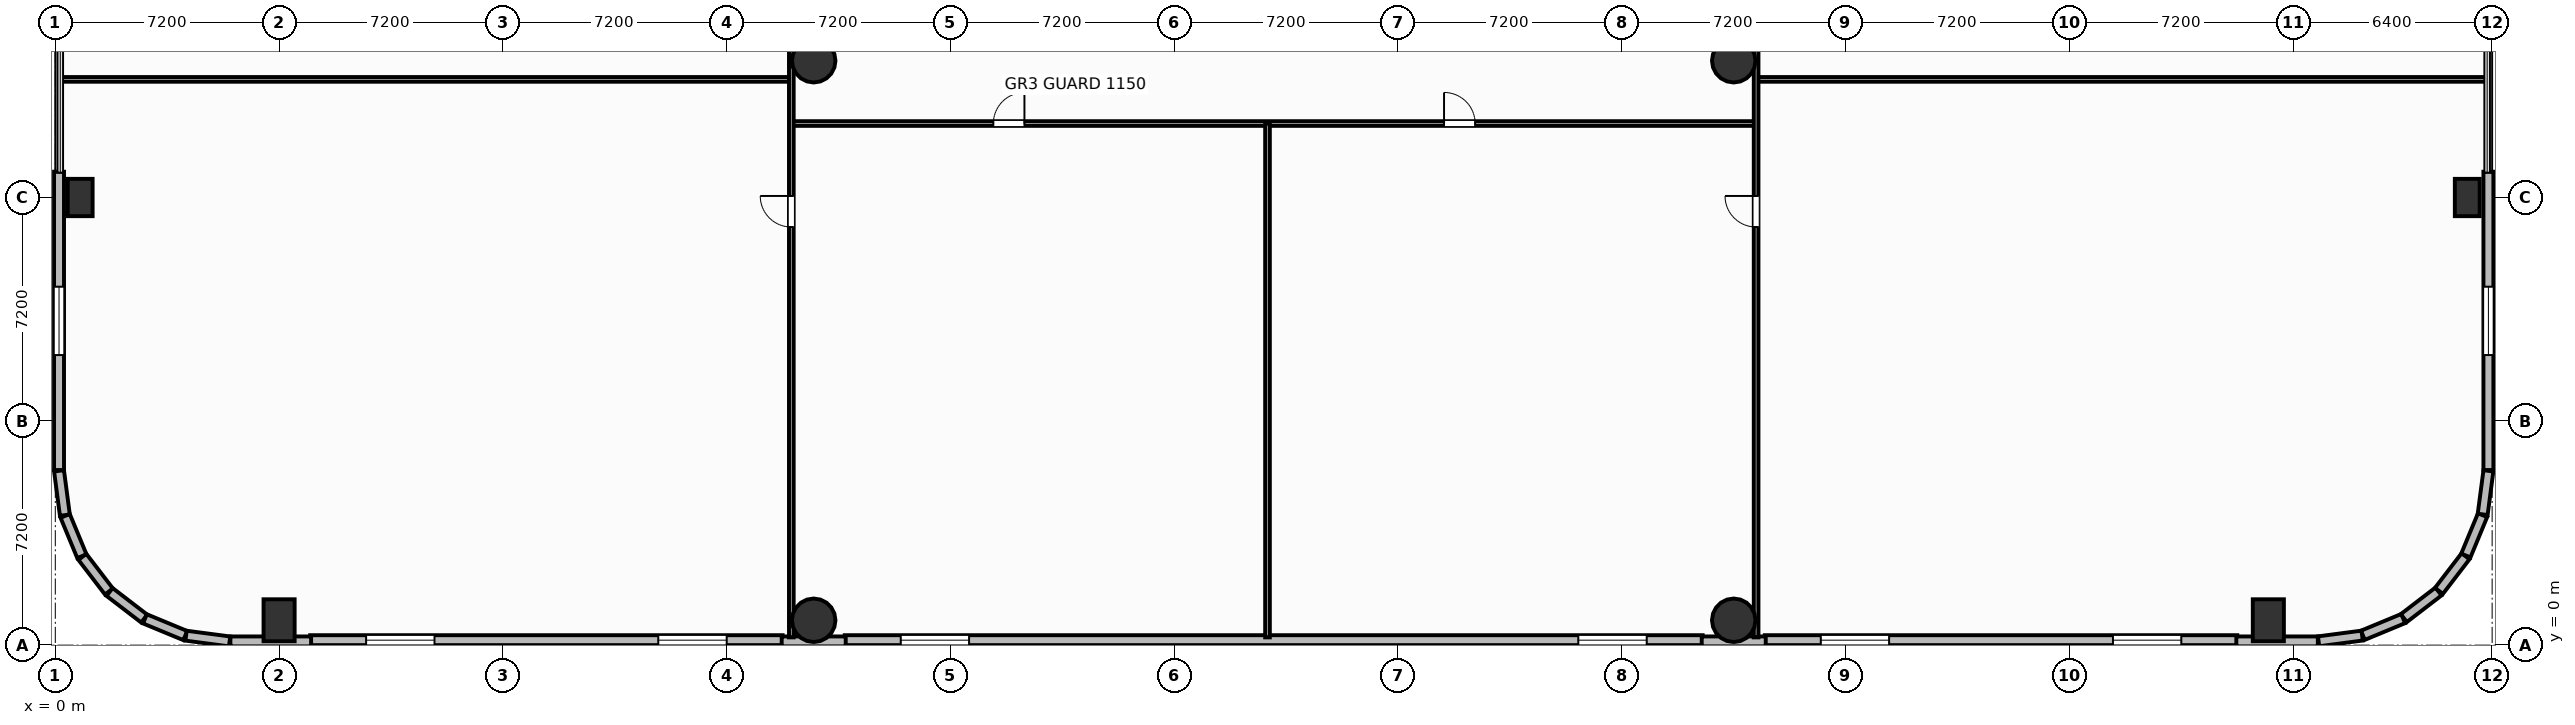
"""IFC4 building model, lengths in metres.
Left out: names, types, materials, properties, quantities, classifications, styles, units other than length and angle.
Written with IfcOpenShell. Run it as: python <this file> out.ifc"""

import sys

from ifc_helpers import new_model, si_unit, direction, frame, frame_2d, origin, origin_2d, place, context, subcontext, project, spatial, rectangle, circle, extrude, element, fill, save


model = new_model("IFC4")
c1 = context("Model", 3, precision=1e-05, world=origin(), true_north=direction((0.0, 1.0)))
c2 = subcontext(c1, "Body", "Model", "MODEL_VIEW")
j1 = project(units=[si_unit("LENGTHUNIT", "METRE"), si_unit("PLANEANGLEUNIT", "RADIAN")], contexts=[c1])
p1 = place(None, origin())
s1 = spatial("IfcSite", under=j1, at=p1, CompositionType="ELEMENT")
p2 = place(p1, origin())
s2 = spatial("IfcBuilding", under=s1, at=p2, CompositionType="ELEMENT")
p3 = place(p2, frame((0.0, 0.0, 21.6)))
s3 = spatial("IfcBuildingStorey", under=s2, at=p3, CompositionType="ELEMENT", Elevation=21.6)
p4 = place(p3, frame((7.2, 0.8, 0.0), z_axis=(0.0, 0.0, 1.0), x_axis=(1.0, 0.0, 0.0)))
e1 = element("IfcColumn", 1, at=p4, inside=s3, PredefinedType="COLUMN", context=c2, shape_type="SweptSolid", body=[
    extrude(rectangle(XDim=1.0, YDim=1.35, at=origin_2d()), origin(), (0.0, 0.0, 1.0), 5.4),
])
for number, where, z_axis, x_axis in (
    (2, (24.4, 0.8, 0.0), (0.0, 0.0, 1.0), (1.0, 0.0, 0.0)),
    (3, (54.0, 0.8, 0.0), (0.0, 0.0, 1.0), (1.0, 0.0, 0.0)),
):
    element("IfcColumn", number, at=place(p3, frame(where, z_axis=z_axis, x_axis=x_axis)), inside=s3, PredefinedType="COLUMN", context=c2, shape_type="SweptSolid", body=[
        extrude(circle(Radius=0.7, at=origin_2d()), origin(), (0.0, 0.0, 1.0), 5.4),
    ])
p5 = place(p3, frame((71.2, 0.8, 0.0), z_axis=(0.0, 0.0, 1.0), x_axis=(1.0, 0.0, 0.0)))
e4 = element("IfcColumn", 4, at=p5, inside=s3, PredefinedType="COLUMN", context=c2, shape_type="SweptSolid", body=[
    extrude(rectangle(XDim=1.0, YDim=1.35, at=origin_2d()), origin(), (0.0, 0.0, 1.0), 5.4),
])
for number, where, z_axis, x_axis in (
    (5, (24.4, 18.8, 0.0), (0.0, 0.0, 1.0), (1.0, 0.0, 0.0)),
    (6, (54.0, 18.8, 0.0), (0.0, 0.0, 1.0), (1.0, 0.0, 0.0)),
):
    element("IfcColumn", number, at=place(p3, frame(where, z_axis=z_axis, x_axis=x_axis)), inside=s3, PredefinedType="COLUMN", context=c2, shape_type="SweptSolid", body=[
        extrude(circle(Radius=0.7, at=origin_2d()), origin(), (0.0, 0.0, 1.0), 5.4),
    ])
for number, where, z_axis, x_axis in (
    (7, (0.8, 14.4, 0.0), (0.0, 0.0, 1.0), (1.0, 0.0, 0.0)),
    (8, (77.6, 14.4, 0.0), (0.0, 0.0, 1.0), (1.0, 0.0, 0.0)),
):
    element("IfcColumn", number, at=place(p3, frame(where, z_axis=z_axis, x_axis=x_axis)), inside=s3, PredefinedType="PILASTER", context=c2, shape_type="SweptSolid", body=[
        extrude(rectangle(XDim=0.8, YDim=1.2, at=origin_2d()), origin(), (0.0, 0.0, 1.0), 5.4),
    ])
p6 = place(p3, frame((23.4, 0.16, 0.0), z_axis=(0.0, 0.0, 1.0), x_axis=(-1.0, 0.0, 0.0)))
e9 = element("IfcWall", 9, at=p6, inside=s3, PredefinedType="SOLIDWALL", context=c2, shape_type="SweptSolid", body=[
    extrude(rectangle(XDim=15.2, YDim=0.32, at=frame_2d((7.6, 0.0))), origin(), (0.0, 0.0, 1.0), 4.1),
])
p7 = place(p6, frame((1.8, 0.0, 0.8)))
e10 = element("IfcOpeningElement", 10, at=p7, cuts=e9, PredefinedType="OPENING", context=c2, shape_type="SweptSolid", body=[
    extrude(rectangle(XDim=2.2, YDim=1.11, at=frame_2d((1.1, 0.555))), frame((0.0, 0.17, 0.0), z_axis=(0.0, -1.0, 0.0), x_axis=(1.0, 0.0, 0.0)), (0.0, 0.0, 1.0), 0.34),
])
p8 = place(p6, frame((11.2, 0.0, 0.8)))
e11 = element("IfcOpeningElement", 11, at=p8, cuts=e9, PredefinedType="OPENING", context=c2, shape_type="SweptSolid", body=[
    extrude(rectangle(XDim=2.2, YDim=1.11, at=frame_2d((1.1, 0.555))), frame((0.0, 0.17, 0.0), z_axis=(0.0, -1.0, 0.0), x_axis=(1.0, 0.0, 0.0)), (0.0, 0.0, 1.0), 0.34),
])
p9 = place(p3, frame((53.0, 0.16, 0.0), z_axis=(0.0, 0.0, 1.0), x_axis=(-1.0, 0.0, 0.0)))
e12 = element("IfcWall", 12, at=p9, inside=s3, PredefinedType="SOLIDWALL", context=c2, shape_type="SweptSolid", body=[
    extrude(rectangle(XDim=27.6, YDim=0.32, at=frame_2d((13.8, 0.0))), origin(), (0.0, 0.0, 1.0), 4.1),
])
p10 = place(p9, frame((1.8, 0.0, 0.8)))
e13 = element("IfcOpeningElement", 13, at=p10, cuts=e12, PredefinedType="OPENING", context=c2, shape_type="SweptSolid", body=[
    extrude(rectangle(XDim=2.2, YDim=1.11, at=frame_2d((1.1, 0.555))), frame((0.0, 0.17, 0.0), z_axis=(0.0, -1.0, 0.0), x_axis=(1.0, 0.0, 0.0)), (0.0, 0.0, 1.0), 0.34),
])
p11 = place(p9, frame((23.6, 0.0, 0.8)))
e14 = element("IfcOpeningElement", 14, at=p11, cuts=e12, PredefinedType="OPENING", context=c2, shape_type="SweptSolid", body=[
    extrude(rectangle(XDim=2.2, YDim=1.11, at=frame_2d((1.1, 0.555))), frame((0.0, 0.17, 0.0), z_axis=(0.0, -1.0, 0.0), x_axis=(1.0, 0.0, 0.0)), (0.0, 0.0, 1.0), 0.34),
])
p12 = place(p3, frame((70.2, 0.16, 0.0), z_axis=(0.0, 0.0, 1.0), x_axis=(-1.0, 0.0, 0.0)))
e15 = element("IfcWall", 15, at=p12, inside=s3, PredefinedType="SOLIDWALL", context=c2, shape_type="SweptSolid", body=[
    extrude(rectangle(XDim=15.2, YDim=0.32, at=frame_2d((7.6, 0.0))), origin(), (0.0, 0.0, 1.0), 4.1),
])
p13 = place(p12, frame((1.8, 0.0, 0.8)))
e16 = element("IfcOpeningElement", 16, at=p13, cuts=e15, PredefinedType="OPENING", context=c2, shape_type="SweptSolid", body=[
    extrude(rectangle(XDim=2.2, YDim=1.11, at=frame_2d((1.1, 0.555))), frame((0.0, 0.17, 0.0), z_axis=(0.0, -1.0, 0.0), x_axis=(1.0, 0.0, 0.0)), (0.0, 0.0, 1.0), 0.34),
])
p14 = place(p12, frame((11.2, 0.0, 0.8)))
e17 = element("IfcOpeningElement", 17, at=p14, cuts=e15, PredefinedType="OPENING", context=c2, shape_type="SweptSolid", body=[
    extrude(rectangle(XDim=2.2, YDim=1.11, at=frame_2d((1.1, 0.555))), frame((0.0, 0.17, 0.0), z_axis=(0.0, -1.0, 0.0), x_axis=(1.0, 0.0, 0.0)), (0.0, 0.0, 1.0), 0.34),
])
p15 = place(p3, frame((0.12, 5.608, 0.0), z_axis=(0.0, 0.0, 1.0), x_axis=(0.130362303307, -0.991466423978, 0.0)))
e18 = element("IfcWall", 18, at=p15, inside=s3, PredefinedType="SOLIDWALL", context=c2, shape_type="SweptSolid", body=[
    extrude(rectangle(XDim=1.438, YDim=0.32, at=frame_2d((0.719, 0.0))), origin(), (0.0, 0.0, 1.0), 4.1),
])
p16 = place(p3, frame((0.317, 4.159, 0.0), z_axis=(0.0, 0.0, 1.0), x_axis=(0.382628033724, -0.923902477434, 0.0)))
e19 = element("IfcWall", 19, at=p16, inside=s3, PredefinedType="SOLIDWALL", context=c2, shape_type="SweptSolid", body=[
    extrude(rectangle(XDim=1.405, YDim=0.32, at=frame_2d((0.703, 0.0))), origin(), (0.0, 0.0, 1.0), 4.1),
])
p17 = place(p3, frame((0.87, 2.841, 0.0), z_axis=(0.0, 0.0, 1.0), x_axis=(0.60871962085, -0.79338541907, 0.0)))
e20 = element("IfcWall", 20, at=p17, inside=s3, PredefinedType="SOLIDWALL", context=c2, shape_type="SweptSolid", body=[
    extrude(rectangle(XDim=1.405, YDim=0.32, at=frame_2d((0.703, 0.0))), origin(), (0.0, 0.0, 1.0), 4.1),
])
for number, where, z_axis, x_axis in (
    (21, (1.746, 1.711, 0.0), (0.0, 0.0, 1.0), (0.793, -0.609, 0.0)),
    (22, (2.884, 0.846, 0.0), (0.0, 0.0, 1.0), (0.924, -0.383, 0.0)),
):
    element("IfcWall", number, at=place(p3, frame(where, z_axis=z_axis, x_axis=x_axis)), inside=s3, PredefinedType="SOLIDWALL", context=c2, shape_type="SweptSolid", body=[
        extrude(rectangle(XDim=1.406, YDim=0.32, at=frame_2d((0.703, 0.0))), origin(), (0.0, 0.0, 1.0), 4.1),
    ])
p18 = place(p3, frame((4.207, 0.304, 0.0), z_axis=(0.0, 0.0, 1.0), x_axis=(0.991457235349, -0.130432168094, 0.0)))
e23 = element("IfcWall", 23, at=p18, inside=s3, PredefinedType="SOLIDWALL", context=c2, shape_type="SweptSolid", body=[
    extrude(rectangle(XDim=1.413, YDim=0.32, at=frame_2d((0.707, 0.0))), origin(), (0.0, 0.0, 1.0), 4.1),
])
p19 = place(p3, frame((5.633, 0.12, 0.0), z_axis=(0.0, 0.0, 1.0), x_axis=(1.0, 0.0, 0.0)))
e24 = element("IfcWall", 24, at=p19, inside=s3, PredefinedType="SOLIDWALL", context=c2, shape_type="SweptSolid", body=[
    extrude(rectangle(XDim=2.597, YDim=0.32, at=frame_2d((1.299, 0.0))), origin(), (0.0, 0.0, 1.0), 4.1),
])
p20 = place(p3, frame((23.37, 0.12, 0.0), z_axis=(0.0, 0.0, 1.0), x_axis=(1.0, 0.0, 0.0)))
e25 = element("IfcWall", 25, at=p20, inside=s3, PredefinedType="SOLIDWALL", context=c2, shape_type="SweptSolid", body=[
    extrude(rectangle(XDim=2.06, YDim=0.32, at=frame_2d((1.03, 0.0))), origin(), (0.0, 0.0, 1.0), 4.1),
])
p21 = place(p3, frame((52.97, 0.12, 0.0), z_axis=(0.0, 0.0, 1.0), x_axis=(1.0, 0.0, 0.0)))
e26 = element("IfcWall", 26, at=p21, inside=s3, PredefinedType="SOLIDWALL", context=c2, shape_type="SweptSolid", body=[
    extrude(rectangle(XDim=2.06, YDim=0.32, at=frame_2d((1.03, 0.0))), origin(), (0.0, 0.0, 1.0), 4.1),
])
p22 = place(p3, frame((70.17, 0.12, 0.0), z_axis=(0.0, 0.0, 1.0), x_axis=(1.0, 0.0, 0.0)))
e27 = element("IfcWall", 27, at=p22, inside=s3, PredefinedType="SOLIDWALL", context=c2, shape_type="SweptSolid", body=[
    extrude(rectangle(XDim=2.622, YDim=0.32, at=frame_2d((1.311, 0.0))), origin(), (0.0, 0.0, 1.0), 4.1),
])
p23 = place(p3, frame((72.817, 0.123, 0.0), z_axis=(0.0, 0.0, 1.0), x_axis=(0.991457235349, 0.130432168094, 0.0)))
e28 = element("IfcWall", 28, at=p23, inside=s3, PredefinedType="SOLIDWALL", context=c2, shape_type="SweptSolid", body=[
    extrude(rectangle(XDim=1.413, YDim=0.32, at=frame_2d((0.707, 0.0))), origin(), (0.0, 0.0, 1.0), 4.1),
])
for number, where, z_axis, x_axis in (
    (29, (74.241, 0.317, 0.0), (0.0, 0.0, 1.0), (0.924, 0.383, 0.0)),
    (30, (75.559, 0.87, 0.0), (0.0, 0.0, 1.0), (0.793, 0.609, 0.0)),
    (31, (76.689, 1.746, 0.0), (0.0, 0.0, 1.0), (0.609, 0.793, 0.0)),
    (32, (77.554, 2.884, 0.0), (0.0, 0.0, 1.0), (0.383, 0.924, 0.0)),
):
    element("IfcWall", number, at=place(p3, frame(where, z_axis=z_axis, x_axis=x_axis)), inside=s3, PredefinedType="SOLIDWALL", context=c2, shape_type="SweptSolid", body=[
        extrude(rectangle(XDim=1.405, YDim=0.32, at=frame_2d((0.703, 0.0))), origin(), (0.0, 0.0, 1.0), 4.1),
    ])
p24 = place(p3, frame((78.096, 4.207, 0.0), z_axis=(0.0, 0.0, 1.0), x_axis=(0.130432168094, 0.991457235349, 0.0)))
e33 = element("IfcWall", 33, at=p24, inside=s3, PredefinedType="SOLIDWALL", context=c2, shape_type="SweptSolid", body=[
    extrude(rectangle(XDim=1.413, YDim=0.32, at=frame_2d((0.707, 0.0))), origin(), (0.0, 0.0, 1.0), 4.1),
])
p25 = place(p3, frame((78.28, 5.633, 0.0), z_axis=(0.0, 0.0, 1.0), x_axis=(0.0, 1.0, 0.0)))
e34 = element("IfcWall", 34, at=p25, inside=s3, PredefinedType="SOLIDWALL", context=c2, shape_type="SweptSolid", body=[
    extrude(rectangle(XDim=9.597, YDim=0.32, at=frame_2d((4.799, 0.0))), origin(), (0.0, 0.0, 1.0), 4.1),
])
p26 = place(p25, frame((3.698, 0.0, 0.8)))
e35 = element("IfcOpeningElement", 35, at=p26, cuts=e34, PredefinedType="OPENING", context=c2, shape_type="SweptSolid", body=[
    extrude(rectangle(XDim=2.2, YDim=2.0, at=frame_2d((1.1, 1.0))), frame((0.0, 0.17, 0.0), z_axis=(0.0, -1.0, 0.0), x_axis=(1.0, 0.0, 0.0)), (0.0, 0.0, 1.0), 0.34),
])
p27 = place(p3, frame((0.12, 15.23, 0.0), z_axis=(0.0, 0.0, 1.0), x_axis=(0.0, -1.0, 0.0)))
e36 = element("IfcWall", 36, at=p27, inside=s3, PredefinedType="SOLIDWALL", context=c2, shape_type="SweptSolid", body=[
    extrude(rectangle(XDim=9.597, YDim=0.32, at=frame_2d((4.799, 0.0))), origin(), (0.0, 0.0, 1.0), 4.1),
])
p28 = place(p27, frame((3.698, 0.0, 0.8)))
e37 = element("IfcOpeningElement", 37, at=p28, cuts=e36, PredefinedType="OPENING", context=c2, shape_type="SweptSolid", body=[
    extrude(rectangle(XDim=2.2, YDim=2.0, at=frame_2d((1.1, 1.0))), frame((0.0, 0.17, 0.0), z_axis=(0.0, -1.0, 0.0), x_axis=(1.0, 0.0, 0.0)), (0.0, 0.0, 1.0), 0.34),
])
for number, where, z_axis, x_axis in (
    (38, (0.2, 18.2, 0.0), (0.0, 0.0, 1.0), (1.0, 0.0, 0.0)),
    (39, (54.72, 18.2, 0.0), (0.0, 0.0, 1.0), (1.0, 0.0, 0.0)),
):
    element("IfcWall", number, at=place(p3, frame(where, z_axis=z_axis, x_axis=x_axis)), inside=s3, PredefinedType="PARTITIONING", context=c2, shape_type="SweptSolid", body=[
        extrude(rectangle(XDim=23.48, YDim=0.15, at=frame_2d((11.74, 0.0))), origin(), (0.0, 0.0, 1.0), 1.935),
    ])
p29 = place(p3, frame((23.68, 16.78, 0.0), z_axis=(0.0, 0.0, 1.0), x_axis=(1.0, 0.0, 0.0)))
e40 = element("IfcWall", 40, at=p29, inside=s3, PredefinedType="PARTITIONING", context=c2, shape_type="SweptSolid", body=[
    extrude(rectangle(XDim=31.04, YDim=0.15, at=frame_2d((15.52, 0.0))), origin(), (0.0, 0.0, 1.0), 5.15),
])
p30 = place(p29, frame((6.5, 0.0, 0.0)))
e41 = element("IfcOpeningElement", 41, at=p30, cuts=e40, PredefinedType="OPENING", context=c2, shape_type="SweptSolid", body=[
    extrude(rectangle(XDim=1.0, YDim=2.05, at=frame_2d((0.5, 1.025))), frame((0.0, 0.085, 0.0), z_axis=(0.0, -1.0, 0.0), x_axis=(1.0, 0.0, 0.0)), (0.0, 0.0, 1.0), 0.17),
])
p31 = place(p29, frame((21.0, 0.0, 0.0)))
e42 = element("IfcOpeningElement", 42, at=p31, cuts=e40, PredefinedType="OPENING", context=c2, shape_type="SweptSolid", body=[
    extrude(rectangle(XDim=1.0, YDim=2.05, at=frame_2d((0.5, 1.025))), frame((0.0, 0.085, 0.0), z_axis=(0.0, -1.0, 0.0), x_axis=(1.0, 0.0, 0.0)), (0.0, 0.0, 1.0), 0.17),
])
p32 = place(p3, frame((39.0, 0.25, 0.0), z_axis=(0.0, 0.0, 1.0), x_axis=(0.0, 1.0, 0.0)))
e43 = element("IfcWall", 43, at=p32, inside=s3, PredefinedType="PARTITIONING", context=c2, shape_type="SweptSolid", body=[
    extrude(rectangle(XDim=16.53, YDim=0.15, at=frame_2d((8.265, 0.0))), origin(), (0.0, 0.0, 1.0), 5.15),
])
p33 = place(p3, frame((23.68, 0.25, 0.0), z_axis=(0.0, 0.0, 1.0), x_axis=(0.0, 1.0, 0.0)))
e44 = element("IfcWall", 44, at=p33, inside=s3, PredefinedType="PARTITIONING", context=c2, shape_type="SweptSolid", body=[
    extrude(rectangle(XDim=26.37, YDim=0.15, at=frame_2d((13.185, 0.0))), origin(), (0.0, 0.0, 1.0), 5.15),
])
p34 = place(p33, frame((21.5, 0.0, 0.0)))
e45 = element("IfcOpeningElement", 45, at=p34, cuts=e44, PredefinedType="OPENING", context=c2, shape_type="SweptSolid", body=[
    extrude(rectangle(XDim=1.0, YDim=2.05, at=frame_2d((0.5, 1.025))), frame((0.0, 0.085, 0.0), z_axis=(0.0, -1.0, 0.0), x_axis=(1.0, 0.0, 0.0)), (0.0, 0.0, 1.0), 0.17),
])
p35 = place(p33, frame((13.2, 0.0, 0.0)))
e46 = element("IfcOpeningElement", 46, at=p35, cuts=e44, PredefinedType="OPENING", context=c2, shape_type="SweptSolid", body=[
    extrude(rectangle(XDim=1.0, YDim=2.05, at=frame_2d((0.5, 1.025))), frame((0.0, 0.085, 0.0), z_axis=(0.0, -1.0, 0.0), x_axis=(1.0, 0.0, 0.0)), (0.0, 0.0, 1.0), 0.17),
])
p36 = place(p3, frame((54.72, 0.25, 0.0), z_axis=(0.0, 0.0, 1.0), x_axis=(0.0, 1.0, 0.0)))
e47 = element("IfcWall", 47, at=p36, inside=s3, PredefinedType="PARTITIONING", context=c2, shape_type="SweptSolid", body=[
    extrude(rectangle(XDim=26.37, YDim=0.15, at=frame_2d((13.185, 0.0))), origin(), (0.0, 0.0, 1.0), 5.15),
])
p37 = place(p36, frame((21.5, 0.0, 0.0)))
e48 = element("IfcOpeningElement", 48, at=p37, cuts=e47, PredefinedType="OPENING", context=c2, shape_type="SweptSolid", body=[
    extrude(rectangle(XDim=1.0, YDim=2.05, at=frame_2d((0.5, 1.025))), frame((0.0, 0.085, 0.0), z_axis=(0.0, -1.0, 0.0), x_axis=(1.0, 0.0, 0.0)), (0.0, 0.0, 1.0), 0.17),
])
p38 = place(p36, frame((13.2, 0.0, 0.0)))
e49 = element("IfcOpeningElement", 49, at=p38, cuts=e47, PredefinedType="OPENING", context=c2, shape_type="SweptSolid", body=[
    extrude(rectangle(XDim=1.0, YDim=2.05, at=frame_2d((0.5, 1.025))), frame((0.0, 0.085, 0.0), z_axis=(0.0, -1.0, 0.0), x_axis=(1.0, 0.0, 0.0)), (0.0, 0.0, 1.0), 0.17),
])
p39 = place(p7, origin())
e50 = element("IfcWindow", 50, at=p39, inside=s3, PartitioningType="SINGLE_PANEL", PredefinedType="WINDOW", context=c2, shape_type="SweptSolid", body=[
    extrude(rectangle(XDim=2.2, YDim=1.11, at=frame_2d((1.1, 0.555))), frame((0.0, 0.03, 0.0), z_axis=(0.0, -1.0, 0.0), x_axis=(1.0, 0.0, 0.0)), (0.0, 0.0, 1.0), 0.06),
])
fill(e10, e50)
p40 = place(p8, origin())
e51 = element("IfcWindow", 51, at=p40, inside=s3, PartitioningType="SINGLE_PANEL", PredefinedType="WINDOW", context=c2, shape_type="SweptSolid", body=[
    extrude(rectangle(XDim=2.2, YDim=1.11, at=frame_2d((1.1, 0.555))), frame((0.0, 0.03, 0.0), z_axis=(0.0, -1.0, 0.0), x_axis=(1.0, 0.0, 0.0)), (0.0, 0.0, 1.0), 0.06),
])
fill(e11, e51)
p41 = place(p10, origin())
e52 = element("IfcWindow", 52, at=p41, inside=s3, PartitioningType="SINGLE_PANEL", PredefinedType="WINDOW", context=c2, shape_type="SweptSolid", body=[
    extrude(rectangle(XDim=2.2, YDim=1.11, at=frame_2d((1.1, 0.555))), frame((0.0, 0.03, 0.0), z_axis=(0.0, -1.0, 0.0), x_axis=(1.0, 0.0, 0.0)), (0.0, 0.0, 1.0), 0.06),
])
fill(e13, e52)
p42 = place(p11, origin())
e53 = element("IfcWindow", 53, at=p42, inside=s3, PartitioningType="SINGLE_PANEL", PredefinedType="WINDOW", context=c2, shape_type="SweptSolid", body=[
    extrude(rectangle(XDim=2.2, YDim=1.11, at=frame_2d((1.1, 0.555))), frame((0.0, 0.03, 0.0), z_axis=(0.0, -1.0, 0.0), x_axis=(1.0, 0.0, 0.0)), (0.0, 0.0, 1.0), 0.06),
])
fill(e14, e53)
p43 = place(p13, origin())
e54 = element("IfcWindow", 54, at=p43, inside=s3, PartitioningType="SINGLE_PANEL", PredefinedType="WINDOW", context=c2, shape_type="SweptSolid", body=[
    extrude(rectangle(XDim=2.2, YDim=1.11, at=frame_2d((1.1, 0.555))), frame((0.0, 0.03, 0.0), z_axis=(0.0, -1.0, 0.0), x_axis=(1.0, 0.0, 0.0)), (0.0, 0.0, 1.0), 0.06),
])
fill(e16, e54)
p44 = place(p14, origin())
e55 = element("IfcWindow", 55, at=p44, inside=s3, PartitioningType="SINGLE_PANEL", PredefinedType="WINDOW", context=c2, shape_type="SweptSolid", body=[
    extrude(rectangle(XDim=2.2, YDim=1.11, at=frame_2d((1.1, 0.555))), frame((0.0, 0.03, 0.0), z_axis=(0.0, -1.0, 0.0), x_axis=(1.0, 0.0, 0.0)), (0.0, 0.0, 1.0), 0.06),
])
fill(e17, e55)
p45 = place(p26, origin())
e56 = element("IfcWindow", 56, at=p45, inside=s3, PartitioningType="SINGLE_PANEL", PredefinedType="WINDOW", context=c2, shape_type="SweptSolid", body=[
    extrude(rectangle(XDim=2.2, YDim=2.0, at=frame_2d((1.1, 1.0))), frame((0.0, 0.03, 0.0), z_axis=(0.0, -1.0, 0.0), x_axis=(1.0, 0.0, 0.0)), (0.0, 0.0, 1.0), 0.06),
])
fill(e35, e56)
p46 = place(p28, origin())
e57 = element("IfcWindow", 57, at=p46, inside=s3, PartitioningType="SINGLE_PANEL", PredefinedType="WINDOW", context=c2, shape_type="SweptSolid", body=[
    extrude(rectangle(XDim=2.2, YDim=2.0, at=frame_2d((1.1, 1.0))), frame((0.0, 0.03, 0.0), z_axis=(0.0, -1.0, 0.0), x_axis=(1.0, 0.0, 0.0)), (0.0, 0.0, 1.0), 0.06),
])
fill(e37, e57)
p47 = place(p30, origin())
e58 = element("IfcDoor", 58, at=p47, inside=s3, OperationType="SINGLE_SWING_RIGHT", PredefinedType="DOOR", context=c2, shape_type="SweptSolid", body=[
    extrude(rectangle(XDim=1.0, YDim=2.05, at=frame_2d((0.5, 1.025))), frame((0.0, 0.025, 0.0), z_axis=(0.0, -1.0, 0.0), x_axis=(1.0, 0.0, 0.0)), (0.0, 0.0, 1.0), 0.05),
])
fill(e41, e58)
p48 = place(p31, origin())
e59 = element("IfcDoor", 59, at=p48, inside=s3, OperationType="SINGLE_SWING_LEFT", PredefinedType="DOOR", context=c2, shape_type="SweptSolid", body=[
    extrude(rectangle(XDim=1.0, YDim=2.05, at=frame_2d((0.5, 1.025))), frame((0.0, 0.025, 0.0), z_axis=(0.0, -1.0, 0.0), x_axis=(1.0, 0.0, 0.0)), (0.0, 0.0, 1.0), 0.05),
])
fill(e42, e59)
p49 = place(p35, origin())
e60 = element("IfcDoor", 60, at=p49, inside=s3, OperationType="SINGLE_SWING_RIGHT", PredefinedType="DOOR", context=c2, shape_type="SweptSolid", body=[
    extrude(rectangle(XDim=1.0, YDim=2.05, at=frame_2d((0.5, 1.025))), frame((0.0, 0.025, 0.0), z_axis=(0.0, -1.0, 0.0), x_axis=(1.0, 0.0, 0.0)), (0.0, 0.0, 1.0), 0.05),
])
fill(e46, e60)
p50 = place(p38, origin())
e61 = element("IfcDoor", 61, at=p50, inside=s3, OperationType="SINGLE_SWING_RIGHT", PredefinedType="DOOR", context=c2, shape_type="SweptSolid", body=[
    extrude(rectangle(XDim=1.0, YDim=2.05, at=frame_2d((0.5, 1.025))), frame((0.0, 0.025, 0.0), z_axis=(0.0, -1.0, 0.0), x_axis=(1.0, 0.0, 0.0)), (0.0, 0.0, 1.0), 0.05),
])
fill(e49, e61)
save(model, sys.argv[1])
